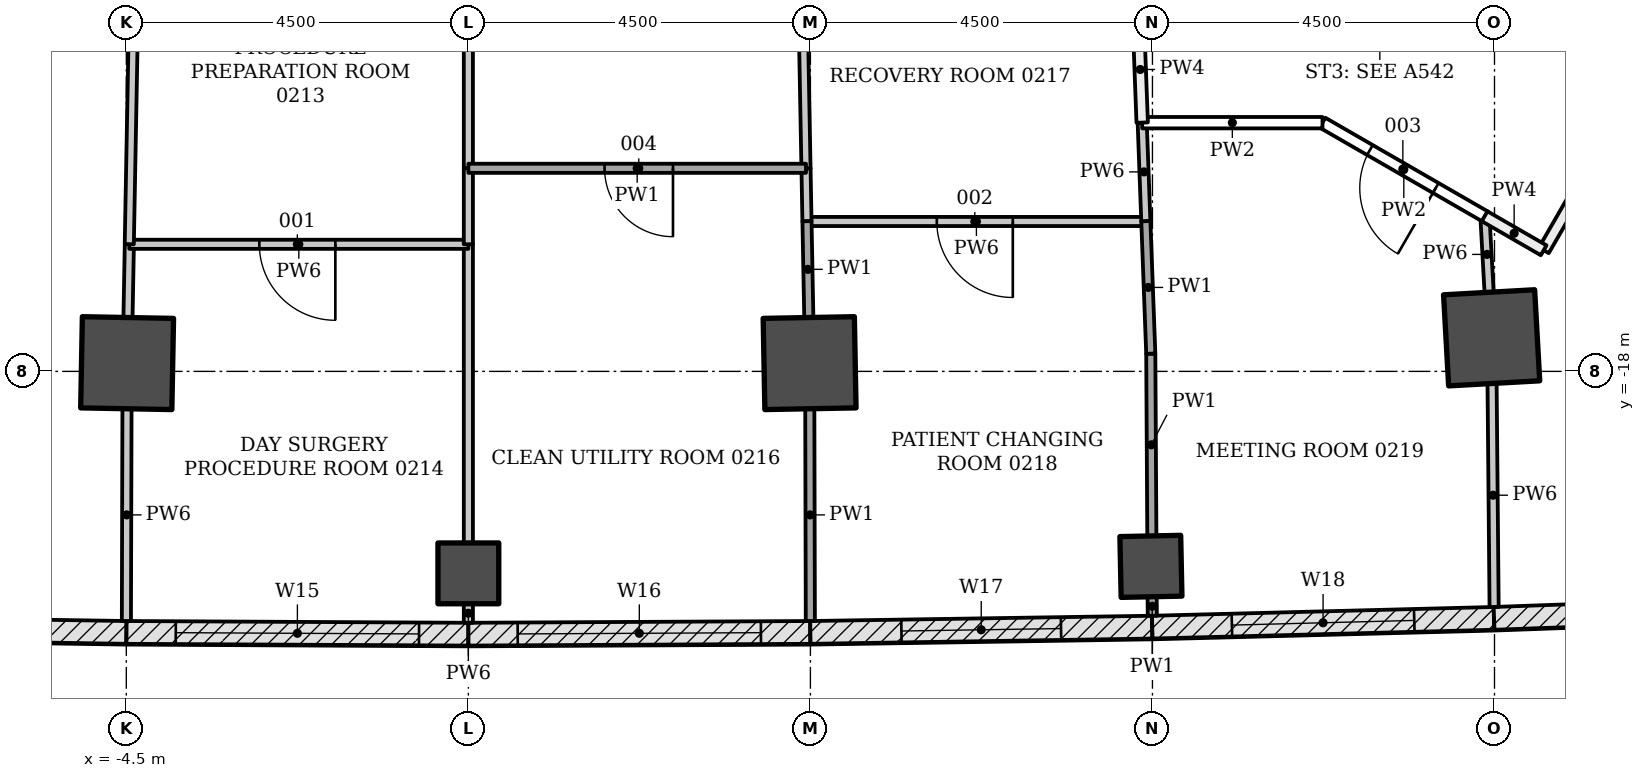
"""IFC4 building model, lengths in metres.
Left out: names, types, materials, properties, quantities, classifications, styles, units other than length and angle.
Written with IfcOpenShell. Run it as: python <this file> out.ifc"""

import sys

from ifc_helpers import new_model, si_unit, direction, frame, frame_2d, origin, origin_2d, place, context, subcontext, project, spatial, rectangle, extrude, element, fill, save


model = new_model("IFC4")
c1 = context("Model", 3, precision=1e-05, world=origin(), true_north=direction((0.0, 1.0)))
c2 = subcontext(c1, "Body", "Model", "MODEL_VIEW")
j1 = project(units=[si_unit("LENGTHUNIT", "METRE"), si_unit("PLANEANGLEUNIT", "RADIAN")], contexts=[c1])
p1 = place(None, origin())
s1 = spatial("IfcSite", under=j1, at=p1, CompositionType="ELEMENT")
p2 = place(p1, origin())
s2 = spatial("IfcBuilding", under=s1, at=p2, CompositionType="ELEMENT")
p3 = place(p2, frame((0.0, 0.0, 10.5)))
s3 = spatial("IfcBuildingStorey", under=s2, at=p3, CompositionType="ELEMENT", Elevation=10.5)
for number, where, z_axis, x_axis in (
    (1, (-4.49, -17.892, -0.25), (0.0, 0.0, 1.0), (-0.019, -1.0, 0.0)),
    (2, (4.49, -17.892, -0.25), (0.0, 0.0, 1.0), (0.019, -1.0, 0.0)),
    (3, (13.462, -17.558, -0.25), (0.0, 0.0, 1.0), (0.056, -0.998, 0.0)),
):
    element("IfcColumn", number, at=place(p3, frame(where, z_axis=z_axis, x_axis=x_axis)), inside=s3, PredefinedType="COLUMN", context=c2, shape_type="SweptSolid", body=[
        extrude(rectangle(XDim=1.2, YDim=1.2, at=origin_2d()), origin(), (0.0, 0.0, 1.0), 4.5),
    ])
for number, where, z_axis, x_axis in (
    (4, (0.0, -20.657, -0.25), (0.0, 0.0, 1.0), (0.0, -1.0, 0.0)),
    (5, (8.98, -20.565, -0.25), (0.0, 0.0, 1.0), (0.021, -1.0, 0.0)),
):
    element("IfcColumn", number, at=place(p3, frame(where, z_axis=z_axis, x_axis=x_axis)), inside=s3, PredefinedType="COLUMN", context=c2, shape_type="SweptSolid", body=[
        extrude(rectangle(XDim=0.8, YDim=0.8, at=origin_2d()), origin(), (0.0, 0.0, 1.0), 4.5),
    ])
p4 = place(p3, frame((-4.5, -21.434, 0.0), z_axis=(0.0, 0.0, 1.0), x_axis=(-0.999881921814, 0.015366926462, 0.0)))
e6 = element("IfcWall", 6, at=p4, inside=s3, PredefinedType="NOTDEFINED", context=c2, shape_type="SweptSolid", body=[
    extrude(rectangle(XDim=4.496, YDim=0.3, at=frame_2d((2.248, 0.0))), origin(), (0.0, 0.0, 1.0), 4.25),
])
p5 = place(p4, frame((1.198, 0.0, 0.8)))
e7 = element("IfcOpeningElement", 7, at=p5, cuts=e6, PredefinedType="OPENING", context=c2, shape_type="SweptSolid", body=[
    extrude(rectangle(XDim=2.1, YDim=3.0, at=frame_2d((1.05, 1.5))), frame((0.0, 0.16, 0.0), z_axis=(0.0, -1.0, 0.0), x_axis=(1.0, 0.0, 0.0)), (0.0, 0.0, 1.0), 0.32),
])
p6 = place(p3, frame((-0.001, -21.457, 0.0), z_axis=(0.0, 0.0, 1.0), x_axis=(-0.999986693461, 0.005158769258, 0.0)))
e8 = element("IfcWall", 8, at=p6, inside=s3, PredefinedType="NOTDEFINED", context=c2, shape_type="SweptSolid", body=[
    extrude(rectangle(XDim=4.496, YDim=0.3, at=frame_2d((2.248, 0.0))), origin(), (0.0, 0.0, 1.0), 4.25),
])
p7 = place(p6, frame((0.648, 0.0, 0.8)))
e9 = element("IfcOpeningElement", 9, at=p7, cuts=e8, PredefinedType="OPENING", context=c2, shape_type="SweptSolid", body=[
    extrude(rectangle(XDim=3.2, YDim=2.7, at=frame_2d((1.6, 1.35))), frame((0.0, 0.16, 0.0), z_axis=(0.0, -1.0, 0.0), x_axis=(1.0, 0.0, 0.0)), (0.0, 0.0, 1.0), 0.32),
])
p8 = place(p3, frame((4.497, -21.434, 0.0), z_axis=(0.0, 0.0, 1.0), x_axis=(-0.999986693461, -0.005158769258, 0.0)))
e10 = element("IfcWall", 10, at=p8, inside=s3, PredefinedType="NOTDEFINED", context=c2, shape_type="SweptSolid", body=[
    extrude(rectangle(XDim=4.496, YDim=0.3, at=frame_2d((2.248, 0.0))), origin(), (0.0, 0.0, 1.0), 4.25),
])
p9 = place(p8, frame((0.648, 0.0, 0.8)))
e11 = element("IfcOpeningElement", 11, at=p9, cuts=e10, PredefinedType="OPENING", context=c2, shape_type="SweptSolid", body=[
    extrude(rectangle(XDim=3.2, YDim=2.7, at=frame_2d((1.6, 1.35))), frame((0.0, 0.16, 0.0), z_axis=(0.0, -1.0, 0.0), x_axis=(1.0, 0.0, 0.0)), (0.0, 0.0, 1.0), 0.32),
])
p10 = place(p3, frame((8.995, -21.365, 0.0), z_axis=(0.0, 0.0, 1.0), x_axis=(-0.999881921814, -0.015366926462, 0.0)))
e12 = element("IfcWall", 12, at=p10, inside=s3, PredefinedType="NOTDEFINED", context=c2, shape_type="SweptSolid", body=[
    extrude(rectangle(XDim=4.496, YDim=0.3, at=frame_2d((2.248, 0.0))), origin(), (0.0, 0.0, 1.0), 4.25),
])
p11 = place(p10, frame((1.198, 0.0, 0.8)))
e13 = element("IfcOpeningElement", 13, at=p11, cuts=e12, PredefinedType="OPENING", context=c2, shape_type="SweptSolid", body=[
    extrude(rectangle(XDim=2.1, YDim=3.0, at=frame_2d((1.05, 1.5))), frame((0.0, 0.16, 0.0), z_axis=(0.0, -1.0, 0.0), x_axis=(1.0, 0.0, 0.0)), (0.0, 0.0, 1.0), 0.32),
])
p12 = place(p3, frame((13.492, -21.25, 0.0), z_axis=(0.0, 0.0, 1.0), x_axis=(-0.999671466587, -0.025631209312, 0.0)))
e14 = element("IfcWall", 14, at=p12, inside=s3, PredefinedType="NOTDEFINED", context=c2, shape_type="SweptSolid", body=[
    extrude(rectangle(XDim=4.496, YDim=0.3, at=frame_2d((2.248, 0.0))), origin(), (0.0, 0.0, 1.0), 4.25),
])
p13 = place(p12, frame((1.048, 0.0, 0.9)))
e15 = element("IfcOpeningElement", 15, at=p13, cuts=e14, PredefinedType="OPENING", context=c2, shape_type="SweptSolid", body=[
    extrude(rectangle(XDim=2.4, YDim=2.4, at=frame_2d((1.2, 1.2))), frame((0.0, 0.16, 0.0), z_axis=(0.0, -1.0, 0.0), x_axis=(1.0, 0.0, 0.0)), (0.0, 0.0, 1.0), 0.32),
])
p14 = place(p3, frame((17.988, -21.088, 0.0), z_axis=(0.0, 0.0, 1.0), x_axis=(-0.999355640029, -0.035892962294, 0.0)))
e16 = element("IfcWall", 16, at=p14, inside=s3, PredefinedType="NOTDEFINED", context=c2, shape_type="SweptSolid", body=[
    extrude(rectangle(XDim=4.496, YDim=0.3, at=frame_2d((2.248, 0.0))), origin(), (0.0, 0.0, 1.0), 4.25),
])
p15 = place(p14, frame((1.048, 0.0, 0.9)))
e17 = element("IfcOpeningElement", 17, at=p15, cuts=e16, PredefinedType="OPENING", context=c2, shape_type="SweptSolid", body=[
    extrude(rectangle(XDim=2.4, YDim=2.4, at=frame_2d((1.2, 1.2))), frame((0.0, 0.16, 0.0), z_axis=(0.0, -1.0, 0.0), x_axis=(1.0, 0.0, 0.0)), (0.0, 0.0, 1.0), 0.32),
])
p16 = place(p3, frame((0.0, -21.307, 0.0), z_axis=(0.0, 0.0, 1.0), x_axis=(0.0, 1.0, 0.0)))
e18 = element("IfcWall", 18, at=p16, inside=s3, PredefinedType="PARTITIONING", context=c2, shape_type="SweptSolid", body=[
    extrude(rectangle(XDim=0.25, YDim=0.12, at=frame_2d((0.125, 0.0))), origin(), (0.0, 0.0, 1.0), 4.25),
])
p17 = place(p3, frame((0.0, -20.257, 0.0), z_axis=(0.0, 0.0, 1.0), x_axis=(0.0, 1.0, 0.0)))
e19 = element("IfcWall", 19, at=p17, inside=s3, PredefinedType="PARTITIONING", context=c2, shape_type="SweptSolid", body=[
    extrude(rectangle(XDim=3.933, YDim=0.12, at=frame_2d((1.967, 0.0))), origin(), (0.0, 0.0, 1.0), 3.638),
])
p18 = place(p3, frame((-4.491, -18.492, 0.0), z_axis=(0.0, 0.0, 1.0), x_axis=(-0.00288561233, -0.999995836612, 0.0)))
e20 = element("IfcWall", 20, at=p18, inside=s3, PredefinedType="PARTITIONING", context=c2, shape_type="SweptSolid", body=[
    extrude(rectangle(XDim=2.792, YDim=0.12, at=frame_2d((1.396, 0.0))), origin(), (0.0, 0.0, 1.0), 3.633),
])
p19 = place(p3, frame((-4.46, -16.324, 0.0), z_axis=(0.0, 0.0, 1.0), x_axis=(-0.018678891577, -0.999825534286, 0.0)))
e21 = element("IfcWall", 21, at=p19, inside=s3, PredefinedType="PARTITIONING", context=c2, shape_type="SweptSolid", body=[
    extrude(rectangle(XDim=0.967, YDim=0.12, at=frame_2d((0.484, 0.0))), origin(), (0.0, 0.0, 1.0), 3.638),
])
p20 = place(p3, frame((0.0, -16.328, 0.0), z_axis=(0.0, 0.0, 1.0), x_axis=(-1.0, 0.0, 0.0)))
e22 = element("IfcWall", 22, at=p20, inside=s3, PredefinedType="PARTITIONING", context=c2, shape_type="SweptSolid", body=[
    extrude(rectangle(XDim=4.461, YDim=0.12, at=frame_2d((2.23, 0.0))), origin(), (0.0, 0.0, 1.0), 3.638),
])
p21 = place(p20, frame((1.75, 0.0, 0.0)))
e23 = element("IfcOpeningElement", 23, at=p21, cuts=e22, PredefinedType="OPENING", context=c2, shape_type="SweptSolid", body=[
    extrude(rectangle(XDim=1.0, YDim=2.1, at=frame_2d((0.5, 1.05))), frame((0.0, 0.07, 0.0), z_axis=(0.0, -1.0, 0.0), x_axis=(1.0, 0.0, 0.0)), (0.0, 0.0, 1.0), 0.14),
])
p22 = place(p3, frame((8.992, -20.165, 0.0), z_axis=(0.0, 0.0, 1.0), x_axis=(-0.005803200997, 0.999983161287, 0.0)))
e24 = element("IfcWall", 24, at=p22, inside=s3, PredefinedType="PARTITIONING", context=c2, shape_type="SweptSolid", body=[
    extrude(rectangle(XDim=2.398, YDim=0.12, at=frame_2d((1.199, 0.0))), origin(), (0.0, 0.0, 1.0), 3.638),
])
p23 = place(p3, frame((8.978, -17.767, 0.0), z_axis=(0.0, 0.0, 1.0), x_axis=(-0.037229075286, 0.999306757684, 0.0)))
e25 = element("IfcWall", 25, at=p23, inside=s3, PredefinedType="PARTITIONING", context=c2, shape_type="SweptSolid", body=[
    extrude(rectangle(XDim=1.744, YDim=0.12, at=frame_2d((0.872, 0.0))), origin(), (0.0, 0.0, 1.0), 3.638),
])
p24 = place(p3, frame((8.998, -21.215, 0.0), z_axis=(0.0, 0.0, 1.0), x_axis=(-0.007812261592, 0.999969483819, 0.0)))
e26 = element("IfcWall", 26, at=p24, inside=s3, PredefinedType="PARTITIONING", context=c2, shape_type="SweptSolid", body=[
    extrude(rectangle(XDim=0.25, YDim=0.12, at=frame_2d((0.125, 0.0))), origin(), (0.0, 0.0, 1.0), 4.25),
])
p25 = place(p3, frame((4.455, -16.024, 0.0), z_axis=(0.0, 0.0, 1.0), x_axis=(0.018879100933, -0.999821773892, 0.0)))
e27 = element("IfcWall", 27, at=p25, inside=s3, PredefinedType="PARTITIONING", context=c2, shape_type="SweptSolid", body=[
    extrude(rectangle(XDim=1.267, YDim=0.12, at=frame_2d((0.634, 0.0))), origin(), (0.0, 0.0, 1.0), 3.638),
])
p26 = place(p3, frame((4.492, -18.492, 0.0), z_axis=(0.0, 0.0, 1.0), x_axis=(0.002535843543, -0.999996784744, 0.0)))
e28 = element("IfcWall", 28, at=p26, inside=s3, PredefinedType="PARTITIONING", context=c2, shape_type="SweptSolid", body=[
    extrude(rectangle(XDim=2.792, YDim=0.12, at=frame_2d((1.396, 0.0))), origin(), (0.0, 0.0, 1.0), 3.633),
])
p27 = place(p3, frame((8.913, -16.028, 0.0), z_axis=(0.0, 0.0, 1.0), x_axis=(-1.0, 0.0, 0.0)))
e29 = element("IfcWall", 29, at=p27, inside=s3, PredefinedType="PARTITIONING", context=c2, shape_type="SweptSolid", body=[
    extrude(rectangle(XDim=4.458, YDim=0.12, at=frame_2d((2.229, 0.0))), origin(), (0.0, 0.0, 1.0), 3.638),
])
p28 = place(p27, frame((1.75, 0.0, 0.0)))
e30 = element("IfcOpeningElement", 30, at=p28, cuts=e29, PredefinedType="OPENING", context=c2, shape_type="SweptSolid", body=[
    extrude(rectangle(XDim=1.0, YDim=2.1, at=frame_2d((0.5, 1.05))), frame((0.0, 0.07, 0.0), z_axis=(0.0, -1.0, 0.0), x_axis=(1.0, 0.0, 0.0)), (0.0, 0.0, 1.0), 0.14),
])
p29 = place(p3, frame((13.429, -16.959, 0.0), z_axis=(0.0, 0.0, 1.0), x_axis=(-0.055063393043, 0.998482860517, 0.0)))
e31 = element("IfcWall", 31, at=p29, inside=s3, PredefinedType="PARTITIONING", context=c2, shape_type="SweptSolid", body=[
    extrude(rectangle(XDim=0.998, YDim=0.12, at=frame_2d((0.499, 0.0))), origin(), (0.0, 0.0, 1.0), 3.638),
])
p30 = place(p3, frame((13.495, -21.099, 0.0), z_axis=(0.0, 0.0, 1.0), x_axis=(-0.009216581037, 0.999957526415, 0.0)))
e32 = element("IfcWall", 32, at=p30, inside=s3, PredefinedType="PARTITIONING", context=c2, shape_type="SweptSolid", body=[
    extrude(rectangle(XDim=2.94, YDim=0.12, at=frame_2d((1.47, 0.0))), origin(), (0.0, 0.0, 1.0), 3.633),
])
p31 = place(p3, frame((8.865, -14.724, 0.0), z_axis=(0.0, 0.0, 1.0), x_axis=(0.03688700211, -0.999319442959, 0.0)))
e33 = element("IfcWall", 33, at=p31, inside=s3, PredefinedType="PARTITIONING", context=c2, shape_type="SweptSolid", body=[
    extrude(rectangle(XDim=1.304, YDim=0.12, at=frame_2d((0.652, 0.0))), origin(), (0.0, 0.0, 1.0), 3.638),
])
p32 = place(p3, frame((13.377, -15.962, 0.0), z_axis=(0.0, 0.0, 1.0), x_axis=(-0.866302389159, 0.499519940081, 0.0)))
e34 = element("IfcWall", 34, at=p32, inside=s3, PredefinedType="PARTITIONING", context=c2, shape_type="SweptSolid", body=[
    extrude(rectangle(XDim=2.47, YDim=0.15, at=frame_2d((1.235, 0.0))), origin(), (0.0, 0.0, 1.0), 3.638),
])
p33 = place(p32, frame((0.75, 0.0, 0.0)))
e35 = element("IfcOpeningElement", 35, at=p33, cuts=e34, PredefinedType="OPENING", context=c2, shape_type="SweptSolid", body=[
    extrude(rectangle(XDim=1.0, YDim=2.1, at=frame_2d((0.5, 1.05))), frame((0.0, 0.085, 0.0), z_axis=(0.0, -1.0, 0.0), x_axis=(1.0, 0.0, 0.0)), (0.0, 0.0, 1.0), 0.17),
])
p34 = place(p3, frame((11.237, -14.728, 0.0), z_axis=(0.0, 0.0, 1.0), x_axis=(-1.0, 0.0, 0.0)))
e36 = element("IfcWall", 36, at=p34, inside=s3, PredefinedType="PARTITIONING", context=c2, shape_type="SweptSolid", body=[
    extrude(rectangle(XDim=2.372, YDim=0.15, at=frame_2d((1.186, 0.0))), origin(), (0.0, 0.0, 1.0), 3.638),
])
p35 = place(p3, frame((0.0, -15.324, 0.0), z_axis=(0.0, 0.0, 1.0), x_axis=(0.0, -1.0, 0.0)))
e37 = element("IfcWall", 37, at=p35, inside=s3, PredefinedType="PARTITIONING", context=c2, shape_type="SweptSolid", body=[
    extrude(rectangle(XDim=1.004, YDim=0.12, at=frame_2d((0.502, 0.0))), origin(), (0.0, 0.0, 1.0), 3.638),
])
p36 = place(p3, frame((4.442, -15.328, 0.0), z_axis=(0.0, 0.0, 1.0), x_axis=(-1.0, 0.0, 0.0)))
e38 = element("IfcWall", 38, at=p36, inside=s3, PredefinedType="PARTITIONING", context=c2, shape_type="SweptSolid", body=[
    extrude(rectangle(XDim=4.442, YDim=0.12, at=frame_2d((2.221, 0.0))), origin(), (0.0, 0.0, 1.0), 3.638),
])
p37 = place(p36, frame((1.75, 0.0, 0.0)))
e39 = element("IfcOpeningElement", 39, at=p37, cuts=e38, PredefinedType="OPENING", context=c2, shape_type="SweptSolid", body=[
    extrude(rectangle(XDim=0.9, YDim=2.1, at=frame_2d((0.45, 1.05))), frame((0.0, 0.07, 0.0), z_axis=(0.0, -1.0, 0.0), x_axis=(1.0, 0.0, 0.0)), (0.0, 0.0, 1.0), 0.14),
])
p38 = place(p3, frame((4.455, -16.027, 0.0), z_axis=(0.0, 0.0, 1.0), x_axis=(-0.01874670497, 0.999824265085, 0.0)))
e40 = element("IfcWall", 40, at=p38, inside=s3, PredefinedType="PARTITIONING", context=c2, shape_type="SweptSolid", body=[
    extrude(rectangle(XDim=0.703, YDim=0.12, at=frame_2d((0.352, 0.0))), origin(), (0.0, 0.0, 1.0), 3.638),
])
p39 = place(p3, frame((17.491, -10.618, 0.0), z_axis=(0.0, 0.0, 1.0), x_axis=(-0.499969057507, -0.866043267704, 0.0)))
e41 = element("IfcWall", 41, at=p39, inside=s3, PredefinedType="PARTITIONING", context=c2, shape_type="SweptSolid", body=[
    extrude(rectangle(XDim=6.685, YDim=0.15, at=frame_2d((3.342, 0.0))), origin(), (0.0, 0.0, 1.0), 3.638),
])
p40 = place(p39, frame((2.45, 0.0, 0.0)))
e42 = element("IfcOpeningElement", 42, at=p40, cuts=e41, PredefinedType="OPENING", context=c2, shape_type="SweptSolid", body=[
    extrude(rectangle(XDim=1.8, YDim=2.1, at=frame_2d((0.9, 1.05))), frame((0.0, 0.085, 0.0), z_axis=(0.0, -1.0, 0.0), x_axis=(1.0, 0.0, 0.0)), (0.0, 0.0, 1.0), 0.17),
])
p41 = place(p3, frame((14.147, -16.407, 0.0), z_axis=(0.0, 0.0, 1.0), x_axis=(-0.866276218641, 0.499565324075, 0.0)))
e43 = element("IfcWall", 43, at=p41, inside=s3, PredefinedType="PARTITIONING", context=c2, shape_type="SweptSolid", body=[
    extrude(rectangle(XDim=0.897, YDim=0.15, at=frame_2d((0.448, 0.0))), origin(), (0.0, 0.0, 1.0), 3.638),
])
p42 = place(p3, frame((-4.461, -16.327, 0.0), z_axis=(0.0, 0.0, 1.0), x_axis=(0.018624139004, 0.999826555682, 0.0)))
e44 = element("IfcWall", 44, at=p42, inside=s3, PredefinedType="PARTITIONING", context=c2, shape_type="SweptSolid", body=[
    extrude(rectangle(XDim=5.899, YDim=0.12, at=frame_2d((2.949, 0.0))), origin(), (0.0, 0.0, 1.0), 3.638),
])
p43 = place(p3, frame((0.0, -15.328, 0.0), z_axis=(0.0, 0.0, 1.0), x_axis=(0.0, 1.0, 0.0)))
e45 = element("IfcWall", 45, at=p43, inside=s3, PredefinedType="PARTITIONING", context=c2, shape_type="SweptSolid", body=[
    extrude(rectangle(XDim=4.9, YDim=0.12, at=frame_2d((2.45, 0.0))), origin(), (0.0, 0.0, 1.0), 3.638),
])
p44 = place(p3, frame((4.442, -15.332, 0.0), z_axis=(0.0, 0.0, 1.0), x_axis=(-0.018519952131, 0.999828490979, 0.0)))
e46 = element("IfcWall", 46, at=p44, inside=s3, PredefinedType="PARTITIONING", context=c2, shape_type="SweptSolid", body=[
    extrude(rectangle(XDim=4.904, YDim=0.12, at=frame_2d((2.452, 0.0))), origin(), (0.0, 0.0, 1.0), 3.638),
])
p45 = place(p3, frame((8.865, -14.727, 0.0), z_axis=(0.0, 0.0, 1.0), x_axis=(-0.037173032443, 0.999308843981, 0.0)))
e47 = element("IfcWall", 47, at=p45, inside=s3, PredefinedType="PARTITIONING", context=c2, shape_type="SweptSolid", body=[
    extrude(rectangle(XDim=1.399, YDim=0.15, at=frame_2d((0.699, 0.0))), origin(), (0.0, 0.0, 1.0), 3.638),
])
p46 = place(p7, origin())
e48 = element("IfcWindow", 48, at=p46, inside=s3, PartitioningType="TRIPLE_PANEL_VERTICAL", PredefinedType="WINDOW", context=c2, shape_type="SweptSolid", body=[
    extrude(rectangle(XDim=3.2, YDim=2.7, at=frame_2d((1.6, 1.35))), frame((0.0, 0.03, 0.0), z_axis=(0.0, -1.0, 0.0), x_axis=(1.0, 0.0, 0.0)), (0.0, 0.0, 1.0), 0.06),
])
fill(e9, e48)
p47 = place(p9, origin())
e49 = element("IfcWindow", 49, at=p47, inside=s3, PartitioningType="TRIPLE_PANEL_VERTICAL", PredefinedType="WINDOW", context=c2, shape_type="SweptSolid", body=[
    extrude(rectangle(XDim=3.2, YDim=2.7, at=frame_2d((1.6, 1.35))), frame((0.0, 0.03, 0.0), z_axis=(0.0, -1.0, 0.0), x_axis=(1.0, 0.0, 0.0)), (0.0, 0.0, 1.0), 0.06),
])
fill(e11, e49)
p48 = place(p11, origin())
e50 = element("IfcWindow", 50, at=p48, inside=s3, PartitioningType="DOUBLE_PANEL_HORIZONTAL", PredefinedType="WINDOW", context=c2, shape_type="SweptSolid", body=[
    extrude(rectangle(XDim=2.1, YDim=3.0, at=frame_2d((1.05, 1.5))), frame((0.0, 0.03, 0.0), z_axis=(0.0, -1.0, 0.0), x_axis=(1.0, 0.0, 0.0)), (0.0, 0.0, 1.0), 0.06),
])
fill(e13, e50)
p49 = place(p13, origin())
e51 = element("IfcWindow", 51, at=p49, inside=s3, PartitioningType="DOUBLE_PANEL_VERTICAL", PredefinedType="WINDOW", context=c2, shape_type="SweptSolid", body=[
    extrude(rectangle(XDim=2.4, YDim=2.4, at=frame_2d((1.2, 1.2))), frame((0.0, 0.03, 0.0), z_axis=(0.0, -1.0, 0.0), x_axis=(1.0, 0.0, 0.0)), (0.0, 0.0, 1.0), 0.06),
])
fill(e15, e51)
p50 = place(p21, origin())
e52 = element("IfcDoor", 52, at=p50, inside=s3, OperationType="SINGLE_SWING_RIGHT", PredefinedType="DOOR", context=c2, shape_type="SweptSolid", body=[
    extrude(rectangle(XDim=1.0, YDim=2.1, at=frame_2d((0.5, 1.05))), frame((0.0, 0.025, 0.0), z_axis=(0.0, -1.0, 0.0), x_axis=(1.0, 0.0, 0.0)), (0.0, 0.0, 1.0), 0.05),
])
fill(e23, e52)
p51 = place(p28, origin())
e53 = element("IfcDoor", 53, at=p51, inside=s3, OperationType="SINGLE_SWING_RIGHT", PredefinedType="DOOR", context=c2, shape_type="SweptSolid", body=[
    extrude(rectangle(XDim=1.0, YDim=2.1, at=frame_2d((0.5, 1.05))), frame((0.0, 0.025, 0.0), z_axis=(0.0, -1.0, 0.0), x_axis=(1.0, 0.0, 0.0)), (0.0, 0.0, 1.0), 0.05),
])
fill(e30, e53)
p52 = place(p33, origin())
e54 = element("IfcDoor", 54, at=p52, inside=s3, OperationType="SINGLE_SWING_RIGHT", PredefinedType="DOOR", context=c2, shape_type="SweptSolid", body=[
    extrude(rectangle(XDim=1.0, YDim=2.1, at=frame_2d((0.5, 1.05))), frame((0.0, 0.025, 0.0), z_axis=(0.0, -1.0, 0.0), x_axis=(1.0, 0.0, 0.0)), (0.0, 0.0, 1.0), 0.05),
])
fill(e35, e54)
p53 = place(p37, origin())
e55 = element("IfcDoor", 55, at=p53, inside=s3, OperationType="SINGLE_SWING_LEFT", PredefinedType="DOOR", context=c2, shape_type="SweptSolid", body=[
    extrude(rectangle(XDim=0.9, YDim=2.1, at=frame_2d((0.45, 1.05))), frame((0.0, 0.025, 0.0), z_axis=(0.0, -1.0, 0.0), x_axis=(1.0, 0.0, 0.0)), (0.0, 0.0, 1.0), 0.05),
])
fill(e39, e55)
save(model, sys.argv[1])
